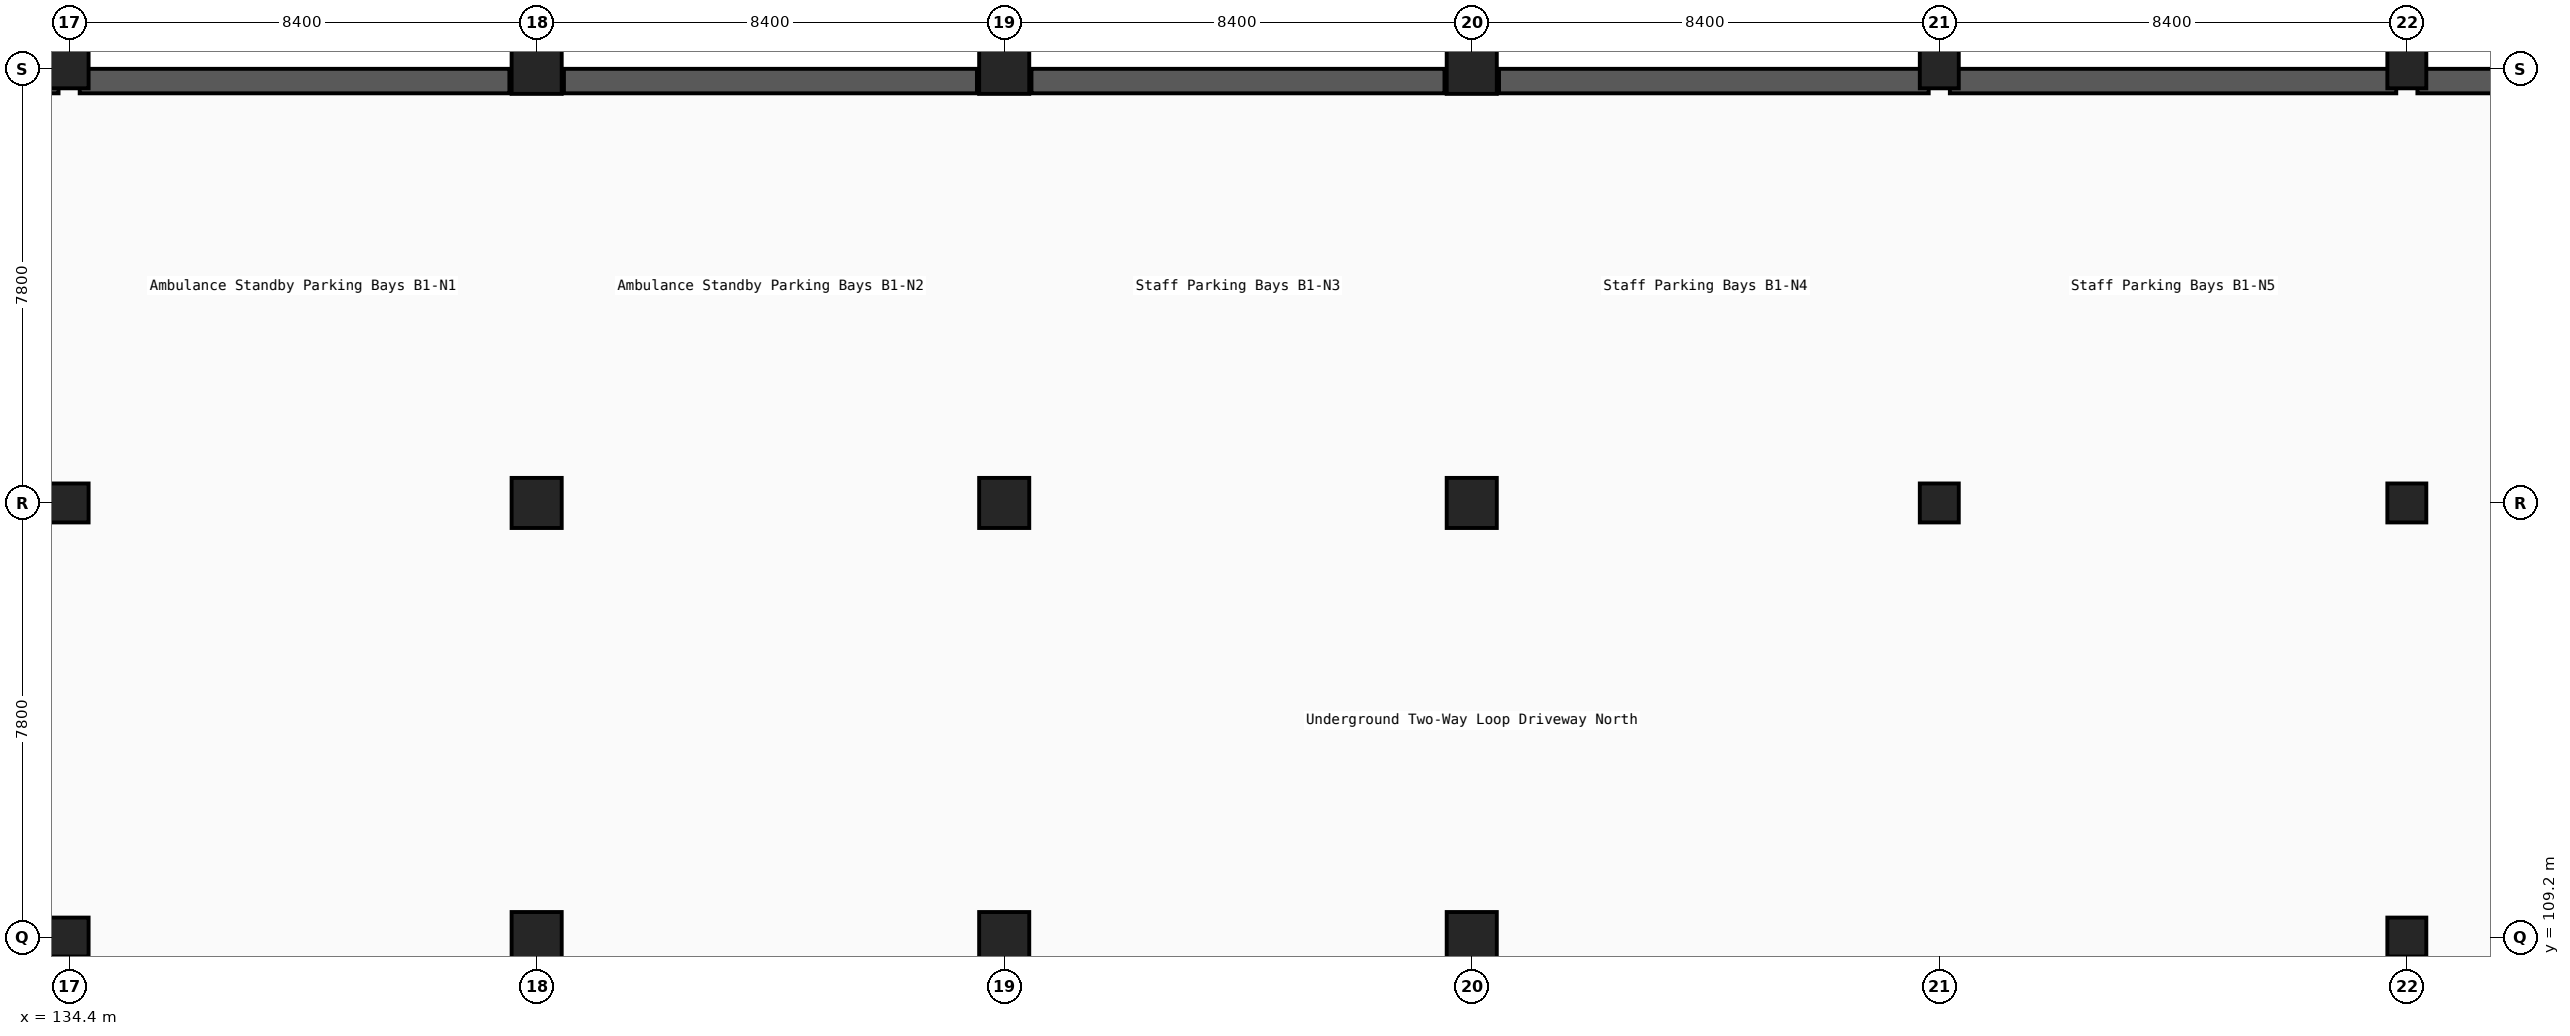
"""IFC4 building model, lengths in metres.
Left out: names, types, materials, properties, quantities, classifications, styles, units other than length and angle.
Written with IfcOpenShell. Run it as: python <this file> out.ifc"""

import sys

from ifc_helpers import new_model, si_unit, direction, frame, frame_2d, origin, origin_2d, place, context, subcontext, project, spatial, rectangle, i_section, extrude, element, save


model = new_model("IFC4")
c1 = context("Model", 3, precision=1e-05, world=origin(), true_north=direction((0.0, 1.0)))
c2 = subcontext(c1, "Body", "Model", "MODEL_VIEW")
j1 = project(units=[si_unit("LENGTHUNIT", "METRE"), si_unit("PLANEANGLEUNIT", "RADIAN")], contexts=[c1])
p1 = place(None, origin())
s1 = spatial("IfcSite", under=j1, at=p1, CompositionType="ELEMENT")
p2 = place(p1, origin())
s2 = spatial("IfcBuilding", under=s1, at=p2, CompositionType="ELEMENT")
p3 = place(p2, frame((0.0, 0.0, -5.1)))
s3 = spatial("IfcBuildingStorey", under=s2, at=p3, CompositionType="ELEMENT", Elevation=-5.1)
for number, where, z_axis, x_axis in (
    (1, (134.4, 109.2, -0.22), (0.0, 0.0, 1.0), (1.0, 0.0, 0.0)),
    (2, (134.4, 117.0, -0.22), (0.0, 0.0, 1.0), (1.0, 0.0, 0.0)),
    (3, (134.4, 124.8, -0.22), (0.0, 0.0, 1.0), (1.0, 0.0, 0.0)),
):
    element("IfcColumn", number, at=place(p3, frame(where, z_axis=z_axis, x_axis=x_axis)), inside=s3, PredefinedType="COLUMN", context=c2, shape_type="SweptSolid", body=[
        extrude(i_section(OverallWidth=0.3, OverallDepth=0.7, WebThickness=0.017, FlangeThickness=0.032, FilletRadius=0.027, at=origin_2d()), origin(), (0.0, 0.0, 1.0), 5.32),
    ])
for number, where, z_axis, x_axis in (
    (4, (142.8, 109.2, -0.22), (0.0, 0.0, 1.0), (1.0, 0.0, 0.0)),
    (5, (142.8, 117.0, -0.22), (0.0, 0.0, 1.0), (1.0, 0.0, 0.0)),
    (6, (142.8, 124.8, -0.22), (0.0, 0.0, 1.0), (1.0, 0.0, 0.0)),
    (7, (151.2, 109.2, -0.22), (0.0, 0.0, 1.0), (1.0, 0.0, 0.0)),
    (8, (151.2, 117.0, -0.22), (0.0, 0.0, 1.0), (1.0, 0.0, 0.0)),
    (9, (151.2, 124.8, -0.22), (0.0, 0.0, 1.0), (1.0, 0.0, 0.0)),
    (10, (159.6, 109.2, -0.22), (0.0, 0.0, 1.0), (1.0, 0.0, 0.0)),
    (11, (159.6, 117.0, -0.22), (0.0, 0.0, 1.0), (1.0, 0.0, 0.0)),
    (12, (159.6, 124.8, -0.22), (0.0, 0.0, 1.0), (1.0, 0.0, 0.0)),
):
    element("IfcColumn", number, at=place(p3, frame(where, z_axis=z_axis, x_axis=x_axis)), inside=s3, PredefinedType="COLUMN", context=c2, shape_type="SweptSolid", body=[
        extrude(rectangle(XDim=0.9, YDim=0.9, at=origin_2d()), origin(), (0.0, 0.0, 1.0), 5.32),
    ])
for number, where, z_axis, x_axis in (
    (13, (168.0, 117.0, -0.22), (0.0, 0.0, 1.0), (1.0, 0.0, 0.0)),
    (14, (168.0, 124.8, -0.22), (0.0, 0.0, 1.0), (1.0, 0.0, 0.0)),
    (15, (176.4, 109.2, -0.22), (0.0, 0.0, 1.0), (1.0, 0.0, 0.0)),
    (16, (176.4, 117.0, -0.22), (0.0, 0.0, 1.0), (1.0, 0.0, 0.0)),
    (17, (176.4, 124.8, -0.22), (0.0, 0.0, 1.0), (1.0, 0.0, 0.0)),
):
    element("IfcColumn", number, at=place(p3, frame(where, z_axis=z_axis, x_axis=x_axis)), inside=s3, PredefinedType="COLUMN", context=c2, shape_type="SweptSolid", body=[
        extrude(i_section(OverallWidth=0.3, OverallDepth=0.7, WebThickness=0.017, FlangeThickness=0.032, FilletRadius=0.027, at=origin_2d()), origin(), (0.0, 0.0, 1.0), 5.32),
    ])
p4 = place(p3, frame((126.19, 124.58, 0.0), z_axis=(0.0, 0.0, 1.0), x_axis=(1.0, 0.0, 0.0)))
e18 = element("IfcWall", 18, at=p4, inside=s3, PredefinedType="USERDEFINED", context=c2, shape_type="SweptSolid", body=[
    extrude(rectangle(XDim=8.02, YDim=0.44, at=frame_2d((4.01, 0.0))), origin(), (0.0, 0.0, 1.0), 4.38),
])
p5 = place(p3, frame((134.59, 124.58, 0.0), z_axis=(0.0, 0.0, 1.0), x_axis=(1.0, 0.0, 0.0)))
e19 = element("IfcWall", 19, at=p5, inside=s3, PredefinedType="USERDEFINED", context=c2, shape_type="SweptSolid", body=[
    extrude(rectangle(XDim=7.72, YDim=0.44, at=frame_2d((3.86, 0.0))), origin(), (0.0, 0.0, 1.0), 4.38),
])
p6 = place(p3, frame((143.29, 124.58, 0.0), z_axis=(0.0, 0.0, 1.0), x_axis=(1.0, 0.0, 0.0)))
e20 = element("IfcWall", 20, at=p6, inside=s3, PredefinedType="USERDEFINED", context=c2, shape_type="SweptSolid", body=[
    extrude(rectangle(XDim=7.42, YDim=0.44, at=frame_2d((3.71, 0.0))), origin(), (0.0, 0.0, 1.0), 4.49),
])
p7 = place(p3, frame((151.69, 124.58, 0.0), z_axis=(0.0, 0.0, 1.0), x_axis=(1.0, 0.0, 0.0)))
e21 = element("IfcWall", 21, at=p7, inside=s3, PredefinedType="USERDEFINED", context=c2, shape_type="SweptSolid", body=[
    extrude(rectangle(XDim=7.42, YDim=0.44, at=frame_2d((3.71, 0.0))), origin(), (0.0, 0.0, 1.0), 4.49),
])
p8 = place(p3, frame((160.09, 124.58, 0.0), z_axis=(0.0, 0.0, 1.0), x_axis=(1.0, 0.0, 0.0)))
e22 = element("IfcWall", 22, at=p8, inside=s3, PredefinedType="USERDEFINED", context=c2, shape_type="SweptSolid", body=[
    extrude(rectangle(XDim=7.72, YDim=0.44, at=frame_2d((3.86, 0.0))), origin(), (0.0, 0.0, 1.0), 4.38),
])
for number, where, z_axis, x_axis in (
    (23, (168.19, 124.58, 0.0), (0.0, 0.0, 1.0), (1.0, 0.0, 0.0)),
    (24, (176.59, 124.58, 0.0), (0.0, 0.0, 1.0), (1.0, 0.0, 0.0)),
):
    element("IfcWall", number, at=place(p3, frame(where, z_axis=z_axis, x_axis=x_axis)), inside=s3, PredefinedType="USERDEFINED", context=c2, shape_type="SweptSolid", body=[
        extrude(rectangle(XDim=8.02, YDim=0.44, at=frame_2d((4.01, 0.0))), origin(), (0.0, 0.0, 1.0), 4.38),
    ])
save(model, sys.argv[1])
